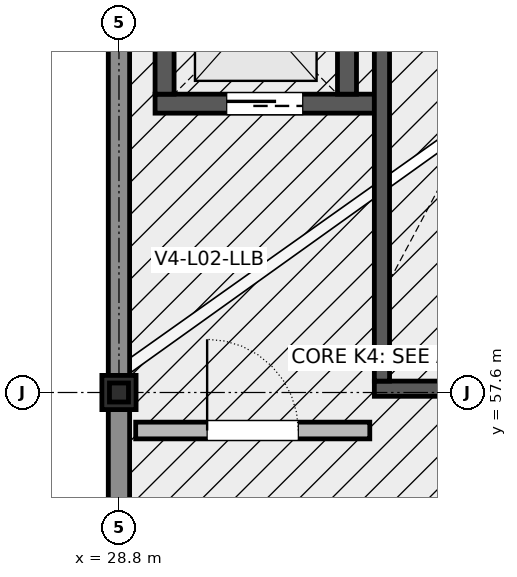
"""IFC4 building model, lengths in metres.
Left out: names, types, materials, properties, quantities, classifications, styles, units other than length and angle.
Written with IfcOpenShell. Run it as: python <this file> out.ifc"""

import sys

from ifc_helpers import new_model, si_unit, direction, frame, frame_2d, origin, origin_2d, place, context, subcontext, project, spatial, rectangle, hollow_rectangle, extrude, element, fill, save


model = new_model("IFC4")
c1 = context("Model", 3, precision=1e-05, world=origin(), true_north=direction((0.0, 1.0)))
c2 = subcontext(c1, "Body", "Model", "MODEL_VIEW")
j1 = project(units=[si_unit("LENGTHUNIT", "METRE"), si_unit("PLANEANGLEUNIT", "RADIAN")], contexts=[c1])
p1 = place(None, origin())
s1 = spatial("IfcSite", under=j1, at=p1, CompositionType="ELEMENT")
p2 = place(p1, origin())
s2 = spatial("IfcBuilding", under=s1, at=p2, CompositionType="ELEMENT")
p3 = place(p2, frame((0.0, 0.0, 9.6)))
s3 = spatial("IfcBuildingStorey", under=s2, at=p3, CompositionType="ELEMENT", Elevation=9.6)
p4 = place(p3, frame((28.8, 57.6, 0.0), z_axis=(0.0, 0.0, 1.0), x_axis=(1.0, 0.0, 0.0)))
e1 = element("IfcColumn", 1, at=p4, inside=s3, PredefinedType="COLUMN", context=c2, shape_type="SweptSolid", body=[
    extrude(rectangle(XDim=0.45, YDim=0.45, at=origin_2d()), origin(), (0.0, 0.0, 1.0), 3.9),
])
p5 = place(p3, frame((29.275, 61.4, 0.0), z_axis=(0.0, 0.0, 1.0), x_axis=(1.0, 0.0, 0.0)))
e2 = element("IfcWall", 2, at=p5, inside=s3, PredefinedType="SHEAR", context=c2, shape_type="SweptSolid", body=[
    extrude(rectangle(XDim=2.885, YDim=0.25, at=frame_2d((1.442, 0.0))), origin(), (0.0, 0.0, 1.0), 3.65),
])
p6 = place(p5, frame((0.942, 0.0, 0.0)))
e3 = element("IfcOpeningElement", 3, at=p6, cuts=e2, PredefinedType="OPENING", context=c2, shape_type="SweptSolid", body=[
    extrude(rectangle(XDim=1.0, YDim=2.1, at=frame_2d((0.5, 1.05))), frame((0.0, 0.137, 0.0), z_axis=(0.0, -1.0, 0.0), x_axis=(1.0, 0.0, 0.0)), (0.0, 0.0, 1.0), 0.274),
])
for number, where, z_axis, x_axis in (
    (4, (29.4, 61.525, 0.0), (0.0, 0.0, 1.0), (0.0, 1.0, 0.0)),
    (5, (31.8, 61.525, 0.0), (0.0, 0.0, 1.0), (0.0, 1.0, 0.0)),
):
    element("IfcWall", number, at=place(p3, frame(where, z_axis=z_axis, x_axis=x_axis)), inside=s3, PredefinedType="SHEAR", context=c2, shape_type="SweptSolid", body=[
        extrude(rectangle(XDim=2.15, YDim=0.25, at=frame_2d((1.075, 0.0))), origin(), (0.0, 0.0, 1.0), 3.65),
    ])
p7 = place(p3, frame((32.16, 57.65, 0.0), z_axis=(0.0, 0.0, 1.0), x_axis=(1.0, 0.0, 0.0)))
e6 = element("IfcWall", 6, at=p7, inside=s3, PredefinedType="SHEAR", context=c2, shape_type="SweptSolid", body=[
    extrude(rectangle(XDim=3.615, YDim=0.2, at=frame_2d((1.808, 0.0))), origin(), (0.0, 0.0, 1.0), 3.65),
])
p8 = place(p7, frame((1.258, 0.0, 0.0)))
e7 = element("IfcOpeningElement", 7, at=p8, cuts=e6, PredefinedType="OPENING", context=c2, shape_type="SweptSolid", body=[
    extrude(rectangle(XDim=1.1, YDim=2.15, at=frame_2d((0.55, 1.075))), frame((0.0, 0.112, 0.0), z_axis=(0.0, -1.0, 0.0), x_axis=(1.0, 0.0, 0.0)), (0.0, 0.0, 1.0), 0.224),
])
p9 = place(p3, frame((32.26, 57.75, 0.0), z_axis=(0.0, 0.0, 1.0), x_axis=(0.0, 1.0, 0.0)))
e8 = element("IfcWall", 8, at=p9, inside=s3, PredefinedType="SHEAR", context=c2, shape_type="SweptSolid", body=[
    extrude(rectangle(XDim=6.56, YDim=0.2, at=frame_2d((3.28, 0.0))), origin(), (0.0, 0.0, 1.0), 3.65),
])
p10 = place(p3, frame((28.8, 57.6, 3.9), z_axis=(0.0, 0.0, 1.0), x_axis=(1.0, 0.0, 0.0)))
e9 = element("IfcColumn", 9, at=p10, inside=s3, PredefinedType="COLUMN", context=c2, shape_type="SweptSolid", body=[
    extrude(hollow_rectangle(XDim=0.25, YDim=0.25, WallThickness=0.012, InnerFilletRadius=0.012, OuterFilletRadius=0.024, at=origin_2d()), origin(), (0.0, 0.0, 1.0), 2.29),
])
p11 = place(p3, frame((28.8, 64.575, 0.0), z_axis=(0.0, 0.0, 1.0), x_axis=(0.0, -1.0, 0.0)))
e10 = element("IfcWall", 10, at=p11, inside=s3, PredefinedType="ELEMENTEDWALL", context=c2, shape_type="SweptSolid", body=[
    extrude(rectangle(XDim=6.75, YDim=0.28, at=frame_2d((3.375, 0.0))), origin(), (0.0, 0.0, 1.0), 3.473),
])
p12 = place(p3, frame((28.8, 57.375, 0.0), z_axis=(0.0, 0.0, 1.0), x_axis=(0.0, -1.0, 0.0)))
e11 = element("IfcWall", 11, at=p12, inside=s3, PredefinedType="ELEMENTEDWALL", context=c2, shape_type="SweptSolid", body=[
    extrude(rectangle(XDim=6.75, YDim=0.28, at=frame_2d((3.375, 0.0))), origin(), (0.0, 0.0, 1.0), 3.473),
])
p13 = place(p12, frame((3.913, 0.0, 0.85)))
e12 = element("IfcOpeningElement", 12, at=p13, cuts=e11, PredefinedType="OPENING", context=c2, shape_type="SweptSolid", body=[
    extrude(rectangle(XDim=1.4, YDim=1.65, at=frame_2d((0.7, 0.825))), frame((0.0, 0.152, 0.0), z_axis=(0.0, -1.0, 0.0), x_axis=(1.0, 0.0, 0.0)), (0.0, 0.0, 1.0), 0.304),
])
p14 = place(p3, frame((28.8, 50.75, 3.95), z_axis=(0.0, 0.0, 1.0), x_axis=(0.0, 1.0, 0.0)))
e13 = element("IfcWall", 13, at=p14, inside=s3, PredefinedType="ELEMENTEDWALL", context=c2, shape_type="SweptSolid", body=[
    extrude(rectangle(XDim=13.7, YDim=0.28, at=frame_2d((6.85, 0.0))), origin(), (0.0, 0.0, 1.0), 2.23),
])
p15 = place(p3, frame((29.02, 57.1, 0.0), z_axis=(0.0, 0.0, 1.0), x_axis=(1.0, 0.0, 0.0)))
e14 = element("IfcWall", 14, at=p15, inside=s3, PredefinedType="STANDARD", context=c2, shape_type="SweptSolid", body=[
    extrude(rectangle(XDim=3.08, YDim=0.22, at=frame_2d((1.54, 0.0))), origin(), (0.0, 0.0, 1.0), 3.62),
])
p16 = place(p15, frame((0.94, 0.0, 0.0)))
e15 = element("IfcOpeningElement", 15, at=p16, cuts=e14, PredefinedType="OPENING", context=c2, shape_type="SweptSolid", body=[
    extrude(rectangle(XDim=1.2, YDim=2.2, at=frame_2d((0.6, 1.1))), frame((0.0, 0.122, 0.0), z_axis=(0.0, -1.0, 0.0), x_axis=(1.0, 0.0, 0.0)), (0.0, 0.0, 1.0), 0.244),
])
p17 = place(p6, origin())
e16 = element("IfcDoor", 16, at=p17, inside=s3, OperationType="SLIDING_TO_RIGHT", PredefinedType="DOOR", context=c2, shape_type="SweptSolid", body=[
    extrude(rectangle(XDim=1.0, YDim=2.1, at=frame_2d((0.5, 1.05))), frame((0.0, 0.025, 0.0), z_axis=(0.0, -1.0, 0.0), x_axis=(1.0, 0.0, 0.0)), (0.0, 0.0, 1.0), 0.05),
])
fill(e3, e16)
p18 = place(p16, origin())
e17 = element("IfcDoor", 17, at=p18, inside=s3, OperationType="SINGLE_SWING_LEFT", PredefinedType="DOOR", context=c2, shape_type="SweptSolid", body=[
    extrude(rectangle(XDim=1.2, YDim=2.2, at=frame_2d((0.6, 1.1))), frame((0.0, 0.025, 0.0), z_axis=(0.0, -1.0, 0.0), x_axis=(1.0, 0.0, 0.0)), (0.0, 0.0, 1.0), 0.05),
])
fill(e15, e17)
save(model, sys.argv[1])
